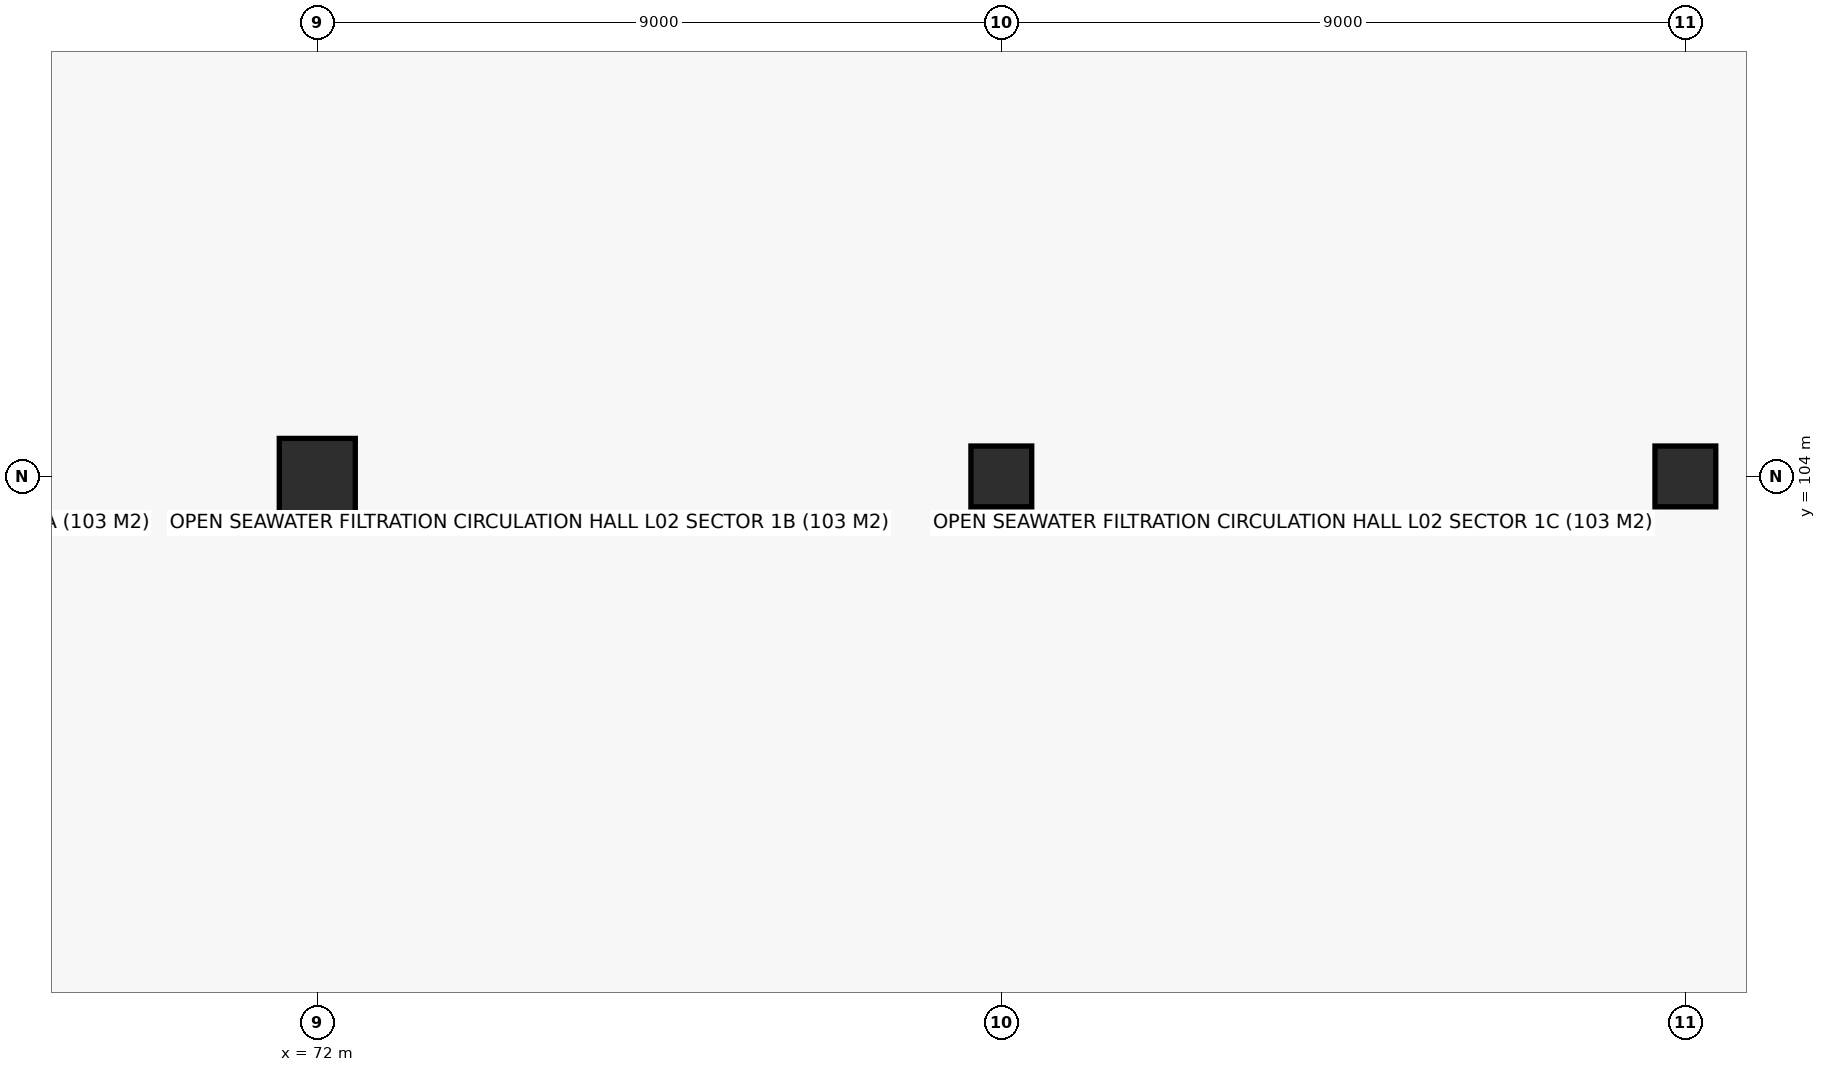
"""IFC4 building model, lengths in metres.
Left out: names, types, materials, properties, quantities, classifications, styles, units other than length and angle.
Written with IfcOpenShell. Run it as: python <this file> out.ifc"""

import sys

from ifc_helpers import new_model, si_unit, direction, frame, origin, origin_2d, place, context, subcontext, project, spatial, rectangle, extrude, element, save


model = new_model("IFC4")
c1 = context("Model", 3, precision=1e-05, world=origin(), true_north=direction((0.0, 1.0)))
c2 = subcontext(c1, "Body", "Model", "MODEL_VIEW")
j1 = project(units=[si_unit("LENGTHUNIT", "METRE"), si_unit("PLANEANGLEUNIT", "RADIAN")], contexts=[c1])
p1 = place(None, origin())
s1 = spatial("IfcSite", under=j1, at=p1, CompositionType="ELEMENT")
p2 = place(p1, origin())
s2 = spatial("IfcBuilding", under=s1, at=p2, CompositionType="ELEMENT")
p3 = place(p2, frame((0.0, 0.0, 9.0)))
s3 = spatial("IfcBuildingStorey", under=s2, at=p3, CompositionType="ELEMENT", Elevation=9.0)
p4 = place(p3, frame((72.0, 104.0, 0.0), z_axis=(0.0, 0.0, 1.0), x_axis=(1.0, 0.0, 0.0)))
e1 = element("IfcColumn", 1, at=p4, inside=s3, PredefinedType="COLUMN", context=c2, shape_type="SweptSolid", body=[
    extrude(rectangle(XDim=1.0, YDim=1.0, at=origin_2d()), origin(), (0.0, 0.0, 1.0), 4.5),
])
for number, where, z_axis, x_axis in (
    (2, (81.0, 104.0, 0.0), (0.0, 0.0, 1.0), (1.0, 0.0, 0.0)),
    (3, (90.0, 104.0, 0.0), (0.0, 0.0, 1.0), (1.0, 0.0, 0.0)),
):
    element("IfcColumn", number, at=place(p3, frame(where, z_axis=z_axis, x_axis=x_axis)), inside=s3, PredefinedType="COLUMN", context=c2, shape_type="SweptSolid", body=[
        extrude(rectangle(XDim=0.8, YDim=0.8, at=origin_2d()), origin(), (0.0, 0.0, 1.0), 4.5),
    ])
save(model, sys.argv[1])
